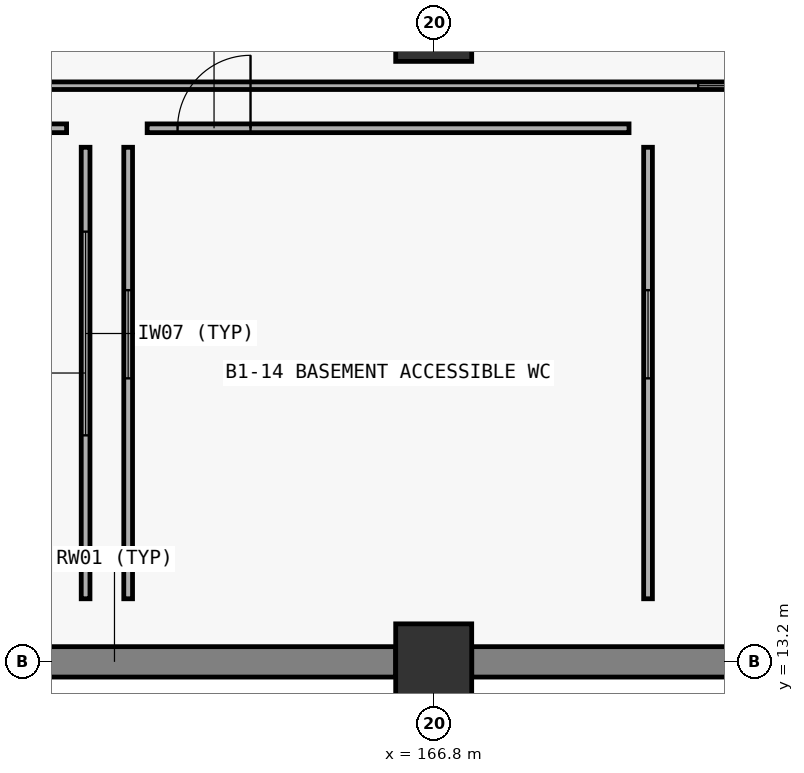
"""IFC4 building model, lengths in metres.
Left out: names, types, materials, properties, quantities, classifications, styles, units other than length and angle.
Written with IfcOpenShell. Run it as: python <this file> out.ifc"""

import sys

from ifc_helpers import new_model, si_unit, direction, frame, frame_2d, origin, origin_2d, place, context, subcontext, project, spatial, rectangle, extrude, element, fill, save


model = new_model("IFC4")
c1 = context("Model", 3, precision=1e-05, world=origin(), true_north=direction((0.0, 1.0)))
c2 = subcontext(c1, "Body", "Model", "MODEL_VIEW")
j1 = project(units=[si_unit("LENGTHUNIT", "METRE"), si_unit("PLANEANGLEUNIT", "RADIAN")], contexts=[c1])
p1 = place(None, origin())
s1 = spatial("IfcSite", under=j1, at=p1, CompositionType="ELEMENT")
p2 = place(p1, origin())
s2 = spatial("IfcBuilding", under=s1, at=p2, CompositionType="ELEMENT")
p3 = place(p2, frame((0.0, 0.0, -4.8)))
s3 = spatial("IfcBuildingStorey", under=s2, at=p3, CompositionType="ELEMENT", Elevation=-4.8)
for number, where, z_axis, x_axis in (
    (1, (166.8, 13.2, 0.0), (0.0, 0.0, 1.0), (1.0, 0.0, 0.0)),
    (2, (166.8, 21.6, 0.0), (0.0, 0.0, 1.0), (1.0, 0.0, 0.0)),
):
    element("IfcColumn", number, at=place(p3, frame(where, z_axis=z_axis, x_axis=x_axis)), inside=s3, PredefinedType="COLUMN", context=c2, shape_type="SweptSolid", body=[
        extrude(rectangle(XDim=1.0, YDim=1.0, at=origin_2d()), origin(), (0.0, 0.0, 1.0), 4.8),
    ])
p4 = place(p3, frame((158.9, 13.2, 0.0), z_axis=(0.0, 0.0, 1.0), x_axis=(1.0, 0.0, 0.0)))
e3 = element("IfcWall", 3, at=p4, inside=s3, PredefinedType="USERDEFINED", context=c2, shape_type="SweptSolid", body=[
    extrude(rectangle(XDim=7.4, YDim=0.4, at=frame_2d((3.7, 0.0))), origin(), (0.0, 0.0, 1.0), 4.8),
])
p5 = place(p3, frame((167.3, 13.2, 0.0), z_axis=(0.0, 0.0, 1.0), x_axis=(1.0, 0.0, 0.0)))
e4 = element("IfcWall", 4, at=p5, inside=s3, PredefinedType="USERDEFINED", context=c2, shape_type="SweptSolid", body=[
    extrude(rectangle(XDim=7.4, YDim=0.4, at=frame_2d((3.7, 0.0))), origin(), (0.0, 0.0, 1.0), 4.8),
])
p6 = place(p3, frame((152.63, 20.78, 0.0), z_axis=(0.0, 0.0, 1.0), x_axis=(1.0, 0.0, 0.0)))
e5 = element("IfcWall", 5, at=p6, inside=s3, PredefinedType="PARTITIONING", context=c2, shape_type="SweptSolid", body=[
    extrude(rectangle(XDim=46.74, YDim=0.1, at=frame_2d((23.37, 0.0))), origin(), (0.0, 0.0, 1.0), 2.96),
])
p7 = place(p6, frame((17.65, 0.0, 0.9)))
e6 = element("IfcOpeningElement", 6, at=p7, cuts=e5, PredefinedType="OPENING", context=c2, shape_type="SweptSolid", body=[
    extrude(rectangle(XDim=1.48, YDim=1.35, at=frame_2d((0.74, 0.675))), frame((0.0, 0.06, 0.0), z_axis=(0.0, -1.0, 0.0), x_axis=(1.0, 0.0, 0.0)), (0.0, 0.0, 1.0), 0.12),
])
p8 = place(p3, frame((156.23, 20.22, 0.0), z_axis=(0.0, 0.0, 1.0), x_axis=(1.0, 0.0, 0.0)))
e7 = element("IfcWall", 7, at=p8, inside=s3, PredefinedType="PARTITIONING", context=c2, shape_type="SweptSolid", body=[
    extrude(rectangle(XDim=5.74, YDim=0.115, at=frame_2d((2.87, 0.0))), origin(), (0.0, 0.0, 1.0), 3.615),
])
p9 = place(p8, frame((4.4, 0.0, 0.0)))
e8 = element("IfcOpeningElement", 8, at=p9, cuts=e7, PredefinedType="OPENING", context=c2, shape_type="SweptSolid", body=[
    extrude(rectangle(XDim=0.9, YDim=2.1, at=frame_2d((0.45, 1.05))), frame((0.0, 0.067, 0.0), z_axis=(0.0, -1.0, 0.0), x_axis=(1.0, 0.0, 0.0)), (0.0, 0.0, 1.0), 0.135),
])
p10 = place(p3, frame((162.22, 14.03, 0.0), z_axis=(0.0, 0.0, 1.0), x_axis=(0.0, 1.0, 0.0)))
e9 = element("IfcWall", 9, at=p10, inside=s3, PredefinedType="PARTITIONING", context=c2, shape_type="SweptSolid", body=[
    extrude(rectangle(XDim=5.94, YDim=0.115, at=frame_2d((2.97, 0.0))), origin(), (0.0, 0.0, 1.0), 4.36),
])
p11 = place(p10, frame((2.15, 0.0, 0.9)))
e10 = element("IfcOpeningElement", 10, at=p11, cuts=e9, PredefinedType="OPENING", context=c2, shape_type="SweptSolid", body=[
    extrude(rectangle(XDim=2.68, YDim=1.52, at=frame_2d((1.34, 0.76))), frame((0.0, 0.067, 0.0), z_axis=(0.0, -1.0, 0.0), x_axis=(1.0, 0.0, 0.0)), (0.0, 0.0, 1.0), 0.135),
])
p12 = place(p3, frame((163.03, 20.22, 0.0), z_axis=(0.0, 0.0, 1.0), x_axis=(1.0, 0.0, 0.0)))
e11 = element("IfcWall", 11, at=p12, inside=s3, PredefinedType="PARTITIONING", context=c2, shape_type="SweptSolid", body=[
    extrude(rectangle(XDim=6.34, YDim=0.115, at=frame_2d((3.17, 0.0))), origin(), (0.0, 0.0, 1.0), 3.46),
])
p13 = place(p12, frame((0.4, 0.0, 0.0)))
e12 = element("IfcOpeningElement", 12, at=p13, cuts=e11, PredefinedType="OPENING", context=c2, shape_type="SweptSolid", body=[
    extrude(rectangle(XDim=0.96, YDim=2.14, at=frame_2d((0.48, 1.07))), frame((0.0, 0.067, 0.0), z_axis=(0.0, -1.0, 0.0), x_axis=(1.0, 0.0, 0.0)), (0.0, 0.0, 1.0), 0.135),
])
p14 = place(p3, frame((162.78, 14.03, 0.0), z_axis=(0.0, 0.0, 1.0), x_axis=(0.0, 1.0, 0.0)))
e13 = element("IfcWall", 13, at=p14, inside=s3, PredefinedType="PARTITIONING", context=c2, shape_type="SweptSolid", body=[
    extrude(rectangle(XDim=5.94, YDim=0.115, at=frame_2d((2.97, 0.0))), origin(), (0.0, 0.0, 1.0), 4.36),
])
p15 = place(p14, frame((2.9, 0.0, 0.9)))
e14 = element("IfcOpeningElement", 14, at=p15, cuts=e13, PredefinedType="OPENING", context=c2, shape_type="SweptSolid", body=[
    extrude(rectangle(XDim=1.16, YDim=1.62, at=frame_2d((0.58, 0.81))), frame((0.0, 0.067, 0.0), z_axis=(0.0, -1.0, 0.0), x_axis=(1.0, 0.0, 0.0)), (0.0, 0.0, 1.0), 0.135),
])
p16 = place(p3, frame((169.62, 14.03, 0.0), z_axis=(0.0, 0.0, 1.0), x_axis=(0.0, 1.0, 0.0)))
e15 = element("IfcWall", 15, at=p16, inside=s3, PredefinedType="PARTITIONING", context=c2, shape_type="SweptSolid", body=[
    extrude(rectangle(XDim=5.94, YDim=0.115, at=frame_2d((2.97, 0.0))), origin(), (0.0, 0.0, 1.0), 4.12),
])
p17 = place(p16, frame((2.9, 0.0, 0.9)))
e16 = element("IfcOpeningElement", 16, at=p17, cuts=e15, PredefinedType="OPENING", context=c2, shape_type="SweptSolid", body=[
    extrude(rectangle(XDim=1.16, YDim=1.62, at=frame_2d((0.58, 0.81))), frame((0.0, 0.067, 0.0), z_axis=(0.0, -1.0, 0.0), x_axis=(1.0, 0.0, 0.0)), (0.0, 0.0, 1.0), 0.135),
])
p18 = place(p7, origin())
e17 = element("IfcWindow", 17, at=p18, inside=s3, PartitioningType="SINGLE_PANEL", PredefinedType="WINDOW", context=c2, shape_type="SweptSolid", body=[
    extrude(rectangle(XDim=1.48, YDim=1.35, at=frame_2d((0.74, 0.675))), frame((0.0, 0.03, 0.0), z_axis=(0.0, -1.0, 0.0), x_axis=(1.0, 0.0, 0.0)), (0.0, 0.0, 1.0), 0.06),
])
fill(e6, e17)
p19 = place(p11, origin())
e18 = element("IfcWindow", 18, at=p19, inside=s3, PartitioningType="SINGLE_PANEL", PredefinedType="WINDOW", context=c2, shape_type="SweptSolid", body=[
    extrude(rectangle(XDim=2.68, YDim=1.52, at=frame_2d((1.34, 0.76))), frame((0.0, 0.03, 0.0), z_axis=(0.0, -1.0, 0.0), x_axis=(1.0, 0.0, 0.0)), (0.0, 0.0, 1.0), 0.06),
])
fill(e10, e18)
p20 = place(p13, origin())
e19 = element("IfcDoor", 19, at=p20, inside=s3, OperationType="SINGLE_SWING_RIGHT", PredefinedType="DOOR", context=c2, shape_type="SweptSolid", body=[
    extrude(rectangle(XDim=0.96, YDim=2.14, at=frame_2d((0.48, 1.07))), frame((0.0, 0.025, 0.0), z_axis=(0.0, -1.0, 0.0), x_axis=(1.0, 0.0, 0.0)), (0.0, 0.0, 1.0), 0.05),
])
fill(e12, e19)
p21 = place(p15, origin())
e20 = element("IfcWindow", 20, at=p21, inside=s3, PartitioningType="SINGLE_PANEL", PredefinedType="WINDOW", context=c2, shape_type="SweptSolid", body=[
    extrude(rectangle(XDim=1.16, YDim=1.62, at=frame_2d((0.58, 0.81))), frame((0.0, 0.03, 0.0), z_axis=(0.0, -1.0, 0.0), x_axis=(1.0, 0.0, 0.0)), (0.0, 0.0, 1.0), 0.06),
])
fill(e14, e20)
p22 = place(p17, origin())
e21 = element("IfcWindow", 21, at=p22, inside=s3, PartitioningType="SINGLE_PANEL", PredefinedType="WINDOW", context=c2, shape_type="SweptSolid", body=[
    extrude(rectangle(XDim=1.16, YDim=1.62, at=frame_2d((0.58, 0.81))), frame((0.0, 0.03, 0.0), z_axis=(0.0, -1.0, 0.0), x_axis=(1.0, 0.0, 0.0)), (0.0, 0.0, 1.0), 0.06),
])
fill(e16, e21)
save(model, sys.argv[1])
